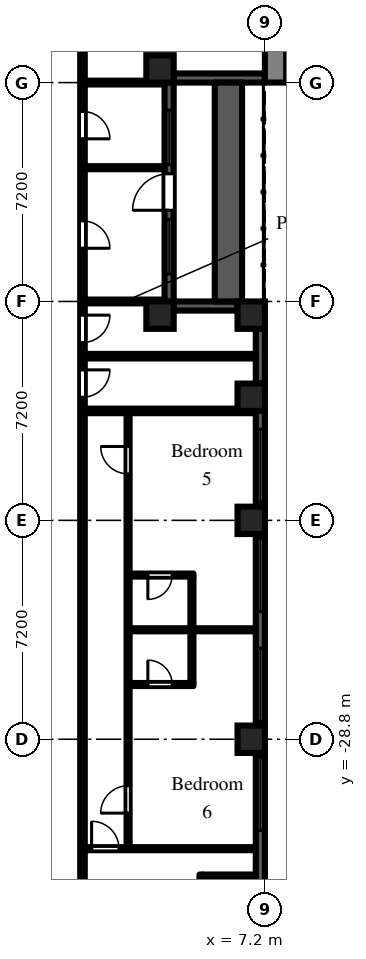
"""IFC4 building model, lengths in metres.
Left out: names, types, materials, properties, quantities, classifications, styles, units other than length and angle.
Written with IfcOpenShell. Run it as: python <this file> out.ifc"""

import sys

from ifc_helpers import new_model, si_unit, direction, frame, frame_2d, origin, origin_2d, place, context, subcontext, project, spatial, rectangle, extrude, element, fill, save


model = new_model("IFC4")
c1 = context("Model", 3, precision=1e-05, world=origin(), true_north=direction((0.0, 1.0)))
c2 = subcontext(c1, "Body", "Model", "MODEL_VIEW")
j1 = project(units=[si_unit("LENGTHUNIT", "METRE"), si_unit("PLANEANGLEUNIT", "RADIAN")], contexts=[c1])
p1 = place(None, origin())
s1 = spatial("IfcSite", under=j1, at=p1, CompositionType="ELEMENT")
p2 = place(p1, origin())
s2 = spatial("IfcBuilding", under=s1, at=p2, CompositionType="ELEMENT")
p3 = place(p2, frame((0.0, 0.0, 53.7)))
s3 = spatial("IfcBuildingStorey", under=s2, at=p3, CompositionType="ELEMENT", Elevation=53.7)
for number, where, z_axis, x_axis in (
    (1, (3.75, -14.85, 0.0), (0.0, 0.0, 1.0), (1.0, 0.0, 0.0)),
    (2, (3.75, -6.75, 0.0), (0.0, 0.0, 1.0), (1.0, 0.0, 0.0)),
    (3, (6.75, -28.8, 0.0), (0.0, 0.0, 1.0), (1.0, 0.0, 0.0)),
    (4, (6.75, -21.6, 0.0), (0.0, 0.0, 1.0), (1.0, 0.0, 0.0)),
    (5, (6.75, -17.55, 0.0), (0.0, 0.0, 1.0), (1.0, 0.0, 0.0)),
    (6, (6.75, -14.85, 0.0), (0.0, 0.0, 1.0), (1.0, 0.0, 0.0)),
):
    element("IfcColumn", number, at=place(p3, frame(where, z_axis=z_axis, x_axis=x_axis)), inside=s3, PredefinedType="COLUMN", context=c2, shape_type="SweptSolid", body=[
        extrude(rectangle(XDim=0.9, YDim=0.9, at=origin_2d()), origin(), (0.0, 0.0, 1.0), 3.0),
    ])
p4 = place(p3, frame((7.05, -35.55, 0.0), z_axis=(0.0, 0.0, 1.0), x_axis=(0.0, 1.0, 0.0)))
e7 = element("IfcWall", 7, at=p4, inside=s3, PredefinedType="SOLIDWALL", context=c2, shape_type="SweptSolid", body=[
    extrude(rectangle(XDim=6.3, YDim=0.3, at=frame_2d((3.15, 0.0))), origin(), (0.0, 0.0, 1.0), 2.1),
])
p5 = place(p4, frame((3.75, 0.0, 0.2)))
e8 = element("IfcOpeningElement", 8, at=p5, cuts=e7, PredefinedType="OPENING", context=c2, shape_type="SweptSolid", body=[
    extrude(rectangle(XDim=2.4, YDim=1.85, at=frame_2d((1.2, 0.925))), frame((0.0, 0.16, 0.0), z_axis=(0.0, -1.0, 0.0), x_axis=(1.0, 0.0, 0.0)), (0.0, 0.0, 1.0), 0.32),
])
p6 = place(p3, frame((7.05, -28.35, 0.0), z_axis=(0.0, 0.0, 1.0), x_axis=(0.0, 1.0, 0.0)))
e9 = element("IfcWall", 9, at=p6, inside=s3, PredefinedType="SOLIDWALL", context=c2, shape_type="SweptSolid", body=[
    extrude(rectangle(XDim=6.3, YDim=0.3, at=frame_2d((3.15, 0.0))), origin(), (0.0, 0.0, 1.0), 2.1),
])
p7 = place(p6, frame((0.15, 0.0, 0.2)))
e10 = element("IfcOpeningElement", 10, at=p7, cuts=e9, PredefinedType="OPENING", context=c2, shape_type="SweptSolid", body=[
    extrude(rectangle(XDim=2.4, YDim=1.85, at=frame_2d((1.2, 0.925))), frame((0.0, 0.16, 0.0), z_axis=(0.0, -1.0, 0.0), x_axis=(1.0, 0.0, 0.0)), (0.0, 0.0, 1.0), 0.32),
])
p8 = place(p6, frame((3.75, 0.0, 0.2)))
e11 = element("IfcOpeningElement", 11, at=p8, cuts=e9, PredefinedType="OPENING", context=c2, shape_type="SweptSolid", body=[
    extrude(rectangle(XDim=2.4, YDim=1.85, at=frame_2d((1.2, 0.925))), frame((0.0, 0.16, 0.0), z_axis=(0.0, -1.0, 0.0), x_axis=(1.0, 0.0, 0.0)), (0.0, 0.0, 1.0), 0.32),
])
p9 = place(p3, frame((7.05, -21.15, 0.0), z_axis=(0.0, 0.0, 1.0), x_axis=(0.0, 1.0, 0.0)))
e12 = element("IfcWall", 12, at=p9, inside=s3, PredefinedType="SOLIDWALL", context=c2, shape_type="SweptSolid", body=[
    extrude(rectangle(XDim=3.15, YDim=0.3, at=frame_2d((1.575, 0.0))), origin(), (0.0, 0.0, 1.0), 2.1),
])
p10 = place(p9, frame((0.15, 0.0, 0.2)))
e13 = element("IfcOpeningElement", 13, at=p10, cuts=e12, PredefinedType="OPENING", context=c2, shape_type="SweptSolid", body=[
    extrude(rectangle(XDim=2.4, YDim=1.85, at=frame_2d((1.2, 0.925))), frame((0.0, 0.16, 0.0), z_axis=(0.0, -1.0, 0.0), x_axis=(1.0, 0.0, 0.0)), (0.0, 0.0, 1.0), 0.32),
])
p11 = place(p3, frame((7.05, -17.1, 0.0), z_axis=(0.0, 0.0, 1.0), x_axis=(0.0, 1.0, 0.0)))
e14 = element("IfcWall", 14, at=p11, inside=s3, PredefinedType="SOLIDWALL", context=c2, shape_type="SweptSolid", body=[
    extrude(rectangle(XDim=1.8, YDim=0.3, at=frame_2d((0.9, 0.0))), origin(), (0.0, 0.0, 1.0), 2.1),
])
p12 = place(p3, frame((6.3, -14.55, 0.0), z_axis=(0.0, 0.0, 1.0), x_axis=(-1.0, 0.0, 0.0)))
e15 = element("IfcWall", 15, at=p12, inside=s3, PredefinedType="SOLIDWALL", context=c2, shape_type="SweptSolid", body=[
    extrude(rectangle(XDim=2.1, YDim=0.3, at=frame_2d((1.05, 0.0))), origin(), (0.0, 0.0, 1.0), 2.1),
])
p13 = place(p3, frame((4.05, -14.4, 0.0), z_axis=(0.0, 0.0, 1.0), x_axis=(0.0, 1.0, 0.0)))
e16 = element("IfcWall", 16, at=p13, inside=s3, PredefinedType="SOLIDWALL", context=c2, shape_type="SweptSolid", body=[
    extrude(rectangle(XDim=7.2, YDim=0.3, at=frame_2d((3.6, 0.0))), origin(), (0.0, 0.0, 1.0), 2.1),
])
p14 = place(p13, frame((3.0, 0.0, 0.0)))
e17 = element("IfcOpeningElement", 17, at=p14, cuts=e16, PredefinedType="OPENING", context=c2, shape_type="SweptSolid", body=[
    extrude(rectangle(XDim=1.2, YDim=2.05, at=frame_2d((0.6, 1.025))), frame((0.0, 0.16, 0.0), z_axis=(0.0, -1.0, 0.0), x_axis=(1.0, 0.0, 0.0)), (0.0, 0.0, 1.0), 0.32),
])
p15 = place(p13, frame((0.9, 0.0, 0.2)))
e18 = element("IfcOpeningElement", 18, at=p15, cuts=e16, PredefinedType="OPENING", context=c2, shape_type="SweptSolid", body=[
    extrude(rectangle(XDim=1.8, YDim=1.85, at=frame_2d((0.9, 0.925))), frame((0.0, 0.16, 0.0), z_axis=(0.0, -1.0, 0.0), x_axis=(1.0, 0.0, 0.0)), (0.0, 0.0, 1.0), 0.32),
])
p16 = place(p13, frame((4.5, 0.0, 0.2)))
e19 = element("IfcOpeningElement", 19, at=p16, cuts=e16, PredefinedType="OPENING", context=c2, shape_type="SweptSolid", body=[
    extrude(rectangle(XDim=1.8, YDim=1.85, at=frame_2d((0.9, 0.925))), frame((0.0, 0.16, 0.0), z_axis=(0.0, -1.0, 0.0), x_axis=(1.0, 0.0, 0.0)), (0.0, 0.0, 1.0), 0.32),
])
p17 = place(p3, frame((4.2, -7.05, 0.0), z_axis=(0.0, 0.0, 1.0), x_axis=(1.0, 0.0, 0.0)))
e20 = element("IfcWall", 20, at=p17, inside=s3, PredefinedType="SOLIDWALL", context=c2, shape_type="SweptSolid", body=[
    extrude(rectangle(XDim=3.0, YDim=0.3, at=frame_2d((1.5, 0.0))), origin(), (0.0, 0.0, 1.0), 2.1),
])
p18 = place(p3, frame((6.0, -14.4, 0.0), z_axis=(0.0, 0.0, 1.0), x_axis=(0.0, 1.0, 0.0)))
e21 = element("IfcWall", 21, at=p18, inside=s3, PredefinedType="PARAPET", context=c2, shape_type="SweptSolid", body=[
    extrude(rectangle(XDim=7.2, YDim=0.9, at=frame_2d((3.6, 0.0))), origin(), (0.0, 0.0, 1.0), 0.8),
])
p19 = place(p3, frame((7.55, -7.2, 0.0), z_axis=(0.0, 0.0, 1.0), x_axis=(0.0, 1.0, 0.0)))
e22 = element("IfcWall", 22, at=p19, inside=s3, PredefinedType="SHEAR", context=c2, shape_type="SweptSolid", body=[
    extrude(rectangle(XDim=14.4, YDim=0.7, at=frame_2d((7.2, 0.0))), origin(), (0.0, 0.0, 1.0), 2.575),
])
p20 = place(p19, frame((6.0, 0.0, 0.0)))
e23 = element("IfcOpeningElement", 23, at=p20, cuts=e22, PredefinedType="OPENING", context=c2, shape_type="SweptSolid", body=[
    extrude(rectangle(XDim=2.4, YDim=2.2, at=frame_2d((1.2, 1.1))), frame((0.0, 0.36, 0.0), z_axis=(0.0, -1.0, 0.0), x_axis=(1.0, 0.0, 0.0)), (0.0, 0.0, 1.0), 0.72),
])
p21 = place(p3, frame((1.2, -36.5, 0.0), z_axis=(0.0, 0.0, 1.0), x_axis=(0.0, 1.0, 0.0)))
e24 = element("IfcWall", 24, at=p21, inside=s3, PredefinedType="PARTITIONING", context=c2, shape_type="SweptSolid", body=[
    extrude(rectangle(XDim=35.375, YDim=0.15, at=frame_2d((17.688, 0.0))), origin(), (0.0, 0.0, 1.0), 2.575),
])
p22 = place(p21, frame((33.65, 0.0, 0.0)))
e25 = element("IfcOpeningElement", 25, at=p22, cuts=e24, PredefinedType="OPENING", context=c2, shape_type="SweptSolid", body=[
    extrude(rectangle(XDim=0.9, YDim=2.1, at=frame_2d((0.45, 1.05))), frame((0.0, 0.085, 0.0), z_axis=(0.0, -1.0, 0.0), x_axis=(1.0, 0.0, 0.0)), (0.0, 0.0, 1.0), 0.17),
])
p23 = place(p21, frame((30.65, 0.0, 0.0)))
e26 = element("IfcOpeningElement", 26, at=p23, cuts=e24, PredefinedType="OPENING", context=c2, shape_type="SweptSolid", body=[
    extrude(rectangle(XDim=0.9, YDim=2.1, at=frame_2d((0.45, 1.05))), frame((0.0, 0.085, 0.0), z_axis=(0.0, -1.0, 0.0), x_axis=(1.0, 0.0, 0.0)), (0.0, 0.0, 1.0), 0.17),
])
p24 = place(p21, frame((27.45, 0.0, 0.0)))
e27 = element("IfcOpeningElement", 27, at=p24, cuts=e24, PredefinedType="OPENING", context=c2, shape_type="SweptSolid", body=[
    extrude(rectangle(XDim=0.9, YDim=2.1, at=frame_2d((0.45, 1.05))), frame((0.0, 0.085, 0.0), z_axis=(0.0, -1.0, 0.0), x_axis=(1.0, 0.0, 0.0)), (0.0, 0.0, 1.0), 0.17),
])
p25 = place(p21, frame((23.85, 0.0, 0.0)))
e28 = element("IfcOpeningElement", 28, at=p25, cuts=e24, PredefinedType="OPENING", context=c2, shape_type="SweptSolid", body=[
    extrude(rectangle(XDim=0.9, YDim=2.1, at=frame_2d((0.45, 1.05))), frame((0.0, 0.085, 0.0), z_axis=(0.0, -1.0, 0.0), x_axis=(1.0, 0.0, 0.0)), (0.0, 0.0, 1.0), 0.17),
])
p26 = place(p21, frame((20.75, 0.0, 0.0)))
e29 = element("IfcOpeningElement", 29, at=p26, cuts=e24, PredefinedType="OPENING", context=c2, shape_type="SweptSolid", body=[
    extrude(rectangle(XDim=0.9, YDim=2.1, at=frame_2d((0.45, 1.05))), frame((0.0, 0.085, 0.0), z_axis=(0.0, -1.0, 0.0), x_axis=(1.0, 0.0, 0.0)), (0.0, 0.0, 1.0), 0.17),
])
p27 = place(p21, frame((18.95, 0.0, 0.0)))
e30 = element("IfcOpeningElement", 30, at=p27, cuts=e24, PredefinedType="OPENING", context=c2, shape_type="SweptSolid", body=[
    extrude(rectangle(XDim=0.9, YDim=2.1, at=frame_2d((0.45, 1.05))), frame((0.0, 0.085, 0.0), z_axis=(0.0, -1.0, 0.0), x_axis=(1.0, 0.0, 0.0)), (0.0, 0.0, 1.0), 0.17),
])
p28 = place(p21, frame((1.55, 0.0, 0.0)))
e31 = element("IfcOpeningElement", 31, at=p28, cuts=e24, PredefinedType="OPENING", context=c2, shape_type="SweptSolid", body=[
    extrude(rectangle(XDim=1.0, YDim=2.1, at=frame_2d((0.5, 1.05))), frame((0.0, 0.085, 0.0), z_axis=(0.0, -1.0, 0.0), x_axis=(1.0, 0.0, 0.0)), (0.0, 0.0, 1.0), 0.17),
])
p29 = place(p3, frame((1.275, -32.4, 0.0), z_axis=(0.0, 0.0, 1.0), x_axis=(1.0, 0.0, 0.0)))
e32 = element("IfcWall", 32, at=p29, inside=s3, PredefinedType="PARTITIONING", context=c2, shape_type="SweptSolid", body=[
    extrude(rectangle(XDim=5.625, YDim=0.1, at=frame_2d((2.812, 0.0))), origin(), (0.0, 0.0, 1.0), 2.575),
])
p30 = place(p29, frame((0.225, 0.0, 0.0)))
e33 = element("IfcOpeningElement", 33, at=p30, cuts=e32, PredefinedType="OPENING", context=c2, shape_type="SweptSolid", body=[
    extrude(rectangle(XDim=0.9, YDim=2.1, at=frame_2d((0.45, 1.05))), frame((0.0, 0.06, 0.0), z_axis=(0.0, -1.0, 0.0), x_axis=(1.0, 0.0, 0.0)), (0.0, 0.0, 1.0), 0.12),
])
for number, where, z_axis, x_axis in (
    (34, (1.275, -18.0, 0.0), (0.0, 0.0, 1.0), (1.0, 0.0, 0.0)),
    (35, (1.275, -16.2, 0.0), (0.0, 0.0, 1.0), (1.0, 0.0, 0.0)),
):
    element("IfcWall", number, at=place(p3, frame(where, z_axis=z_axis, x_axis=x_axis)), inside=s3, PredefinedType="PARTITIONING", context=c2, shape_type="SweptSolid", body=[
        extrude(rectangle(XDim=5.625, YDim=0.15, at=frame_2d((2.812, 0.0))), origin(), (0.0, 0.0, 1.0), 2.575),
    ])
p31 = place(p3, frame((1.275, -14.4, 0.0), z_axis=(0.0, 0.0, 1.0), x_axis=(1.0, 0.0, 0.0)))
e36 = element("IfcWall", 36, at=p31, inside=s3, PredefinedType="PARTITIONING", context=c2, shape_type="SweptSolid", body=[
    extrude(rectangle(XDim=2.625, YDim=0.125, at=frame_2d((1.312, 0.0))), origin(), (0.0, 0.0, 1.0), 2.575),
])
p32 = place(p3, frame((1.275, -10.0, 0.0), z_axis=(0.0, 0.0, 1.0), x_axis=(1.0, 0.0, 0.0)))
e37 = element("IfcWall", 37, at=p32, inside=s3, PredefinedType="PARTITIONING", context=c2, shape_type="SweptSolid", body=[
    extrude(rectangle(XDim=2.625, YDim=0.1, at=frame_2d((1.312, 0.0))), origin(), (0.0, 0.0, 1.0), 2.575),
])
p33 = place(p3, frame((1.275, -7.2, 0.0), z_axis=(0.0, 0.0, 1.0), x_axis=(1.0, 0.0, 0.0)))
e38 = element("IfcWall", 38, at=p33, inside=s3, PredefinedType="PARTITIONING", context=c2, shape_type="SweptSolid", body=[
    extrude(rectangle(XDim=2.625, YDim=0.125, at=frame_2d((1.312, 0.0))), origin(), (0.0, 0.0, 1.0), 2.575),
])
p34 = place(p3, frame((2.7, -32.35, 0.0), z_axis=(0.0, 0.0, 1.0), x_axis=(0.0, 1.0, 0.0)))
e39 = element("IfcWall", 39, at=p34, inside=s3, PredefinedType="PARTITIONING", context=c2, shape_type="SweptSolid", body=[
    extrude(rectangle(XDim=14.275, YDim=0.1, at=frame_2d((7.138, 0.0))), origin(), (0.0, 0.0, 1.0), 2.575),
])
p35 = place(p34, frame((1.12, 0.0, 0.0)))
e40 = element("IfcOpeningElement", 40, at=p35, cuts=e39, PredefinedType="OPENING", context=c2, shape_type="SweptSolid", body=[
    extrude(rectangle(XDim=0.9, YDim=2.1, at=frame_2d((0.45, 1.05))), frame((0.0, 0.06, 0.0), z_axis=(0.0, -1.0, 0.0), x_axis=(1.0, 0.0, 0.0)), (0.0, 0.0, 1.0), 0.12),
])
p36 = place(p34, frame((12.28, 0.0, 0.0)))
e41 = element("IfcOpeningElement", 41, at=p36, cuts=e39, PredefinedType="OPENING", context=c2, shape_type="SweptSolid", body=[
    extrude(rectangle(XDim=0.9, YDim=2.1, at=frame_2d((0.45, 1.05))), frame((0.0, 0.06, 0.0), z_axis=(0.0, -1.0, 0.0), x_axis=(1.0, 0.0, 0.0)), (0.0, 0.0, 1.0), 0.12),
])
p37 = place(p3, frame((2.75, -27.0, 0.0), z_axis=(0.0, 0.0, 1.0), x_axis=(1.0, 0.0, 0.0)))
e42 = element("IfcWall", 42, at=p37, inside=s3, PredefinedType="PARTITIONING", context=c2, shape_type="SweptSolid", body=[
    extrude(rectangle(XDim=2.1, YDim=0.1, at=frame_2d((1.05, 0.0))), origin(), (0.0, 0.0, 1.0), 2.575),
])
p38 = place(p37, frame((0.6, 0.0, 0.0)))
e43 = element("IfcOpeningElement", 43, at=p38, cuts=e42, PredefinedType="OPENING", context=c2, shape_type="SweptSolid", body=[
    extrude(rectangle(XDim=0.8, YDim=2.1, at=frame_2d((0.4, 1.05))), frame((0.0, 0.06, 0.0), z_axis=(0.0, -1.0, 0.0), x_axis=(1.0, 0.0, 0.0)), (0.0, 0.0, 1.0), 0.12),
])
p39 = place(p3, frame((2.75, -25.2, 0.0), z_axis=(0.0, 0.0, 1.0), x_axis=(1.0, 0.0, 0.0)))
e44 = element("IfcWall", 44, at=p39, inside=s3, PredefinedType="PARTITIONING", context=c2, shape_type="SweptSolid", body=[
    extrude(rectangle(XDim=4.15, YDim=0.1, at=frame_2d((2.075, 0.0))), origin(), (0.0, 0.0, 1.0), 2.575),
])
p40 = place(p3, frame((2.75, -23.4, 0.0), z_axis=(0.0, 0.0, 1.0), x_axis=(1.0, 0.0, 0.0)))
e45 = element("IfcWall", 45, at=p40, inside=s3, PredefinedType="PARTITIONING", context=c2, shape_type="SweptSolid", body=[
    extrude(rectangle(XDim=2.1, YDim=0.1, at=frame_2d((1.05, 0.0))), origin(), (0.0, 0.0, 1.0), 2.575),
])
p41 = place(p40, frame((0.6, 0.0, 0.0)))
e46 = element("IfcOpeningElement", 46, at=p41, cuts=e45, PredefinedType="OPENING", context=c2, shape_type="SweptSolid", body=[
    extrude(rectangle(XDim=0.8, YDim=2.1, at=frame_2d((0.4, 1.05))), frame((0.0, 0.06, 0.0), z_axis=(0.0, -1.0, 0.0), x_axis=(1.0, 0.0, 0.0)), (0.0, 0.0, 1.0), 0.12),
])
p42 = place(p3, frame((4.8, -26.95, 0.0), z_axis=(0.0, 0.0, 1.0), x_axis=(0.0, 1.0, 0.0)))
e47 = element("IfcWall", 47, at=p42, inside=s3, PredefinedType="PARTITIONING", context=c2, shape_type="SweptSolid", body=[
    extrude(rectangle(XDim=3.5, YDim=0.1, at=frame_2d((1.75, 0.0))), origin(), (0.0, 0.0, 1.0), 2.575),
])
p43 = place(p3, frame((5.1, -35.15, 0.0), z_axis=(0.0, 0.0, 1.0), x_axis=(0.0, 1.0, 0.0)))
e48 = element("IfcWall", 48, at=p43, inside=s3, PredefinedType="PARTITIONING", context=c2, shape_type="SweptSolid", body=[
    extrude(rectangle(XDim=1.9, YDim=0.1, at=frame_2d((0.95, 0.0))), origin(), (0.0, 0.0, 1.0), 2.575),
])
p44 = place(p43, frame((0.55, 0.0, 0.0)))
e49 = element("IfcOpeningElement", 49, at=p44, cuts=e48, PredefinedType="OPENING", context=c2, shape_type="SweptSolid", body=[
    extrude(rectangle(XDim=0.8, YDim=2.1, at=frame_2d((0.4, 1.05))), frame((0.0, 0.06, 0.0), z_axis=(0.0, -1.0, 0.0), x_axis=(1.0, 0.0, 0.0)), (0.0, 0.0, 1.0), 0.12),
])
p45 = place(p3, frame((5.15, -33.3, 0.0), z_axis=(0.0, 0.0, 1.0), x_axis=(1.0, 0.0, 0.0)))
e50 = element("IfcWall", 50, at=p45, inside=s3, PredefinedType="PARTITIONING", context=c2, shape_type="SweptSolid", body=[
    extrude(rectangle(XDim=1.75, YDim=0.1, at=frame_2d((0.875, 0.0))), origin(), (0.0, 0.0, 1.0), 2.575),
])
p46 = place(p5, origin())
e51 = element("IfcWindow", 51, at=p46, inside=s3, PartitioningType="SINGLE_PANEL", PredefinedType="WINDOW", context=c2, shape_type="SweptSolid", body=[
    extrude(rectangle(XDim=2.4, YDim=1.85, at=frame_2d((1.2, 0.925))), frame((0.0, 0.03, 0.0), z_axis=(0.0, -1.0, 0.0), x_axis=(1.0, 0.0, 0.0)), (0.0, 0.0, 1.0), 0.06),
])
fill(e8, e51)
p47 = place(p7, origin())
e52 = element("IfcWindow", 52, at=p47, inside=s3, PartitioningType="SINGLE_PANEL", PredefinedType="WINDOW", context=c2, shape_type="SweptSolid", body=[
    extrude(rectangle(XDim=2.4, YDim=1.85, at=frame_2d((1.2, 0.925))), frame((0.0, 0.03, 0.0), z_axis=(0.0, -1.0, 0.0), x_axis=(1.0, 0.0, 0.0)), (0.0, 0.0, 1.0), 0.06),
])
fill(e10, e52)
p48 = place(p8, origin())
e53 = element("IfcWindow", 53, at=p48, inside=s3, PartitioningType="SINGLE_PANEL", PredefinedType="WINDOW", context=c2, shape_type="SweptSolid", body=[
    extrude(rectangle(XDim=2.4, YDim=1.85, at=frame_2d((1.2, 0.925))), frame((0.0, 0.03, 0.0), z_axis=(0.0, -1.0, 0.0), x_axis=(1.0, 0.0, 0.0)), (0.0, 0.0, 1.0), 0.06),
])
fill(e11, e53)
p49 = place(p10, origin())
e54 = element("IfcWindow", 54, at=p49, inside=s3, PartitioningType="SINGLE_PANEL", PredefinedType="WINDOW", context=c2, shape_type="SweptSolid", body=[
    extrude(rectangle(XDim=2.4, YDim=1.85, at=frame_2d((1.2, 0.925))), frame((0.0, 0.03, 0.0), z_axis=(0.0, -1.0, 0.0), x_axis=(1.0, 0.0, 0.0)), (0.0, 0.0, 1.0), 0.06),
])
fill(e13, e54)
p50 = place(p14, origin())
e55 = element("IfcDoor", 55, at=p50, inside=s3, OperationType="SINGLE_SWING_LEFT", PredefinedType="DOOR", context=c2, shape_type="SweptSolid", body=[
    extrude(rectangle(XDim=1.2, YDim=2.05, at=frame_2d((0.6, 1.025))), frame((0.0, 0.025, 0.0), z_axis=(0.0, -1.0, 0.0), x_axis=(1.0, 0.0, 0.0)), (0.0, 0.0, 1.0), 0.05),
])
fill(e17, e55)
p51 = place(p15, origin())
e56 = element("IfcWindow", 56, at=p51, inside=s3, PartitioningType="SINGLE_PANEL", PredefinedType="WINDOW", context=c2, shape_type="SweptSolid", body=[
    extrude(rectangle(XDim=1.8, YDim=1.85, at=frame_2d((0.9, 0.925))), frame((0.0, 0.03, 0.0), z_axis=(0.0, -1.0, 0.0), x_axis=(1.0, 0.0, 0.0)), (0.0, 0.0, 1.0), 0.06),
])
fill(e18, e56)
p52 = place(p16, origin())
e57 = element("IfcWindow", 57, at=p52, inside=s3, PartitioningType="SINGLE_PANEL", PredefinedType="WINDOW", context=c2, shape_type="SweptSolid", body=[
    extrude(rectangle(XDim=1.8, YDim=1.85, at=frame_2d((0.9, 0.925))), frame((0.0, 0.03, 0.0), z_axis=(0.0, -1.0, 0.0), x_axis=(1.0, 0.0, 0.0)), (0.0, 0.0, 1.0), 0.06),
])
fill(e19, e57)
p53 = place(p24, frame((0.9, 0.0, 0.0), z_axis=(0.0, 0.0, 1.0), x_axis=(-1.0, 0.0, 0.0)))
e58 = element("IfcDoor", 58, at=p53, inside=s3, OperationType="SINGLE_SWING_RIGHT", PredefinedType="DOOR", context=c2, shape_type="SweptSolid", body=[
    extrude(rectangle(XDim=0.9, YDim=2.1, at=frame_2d((0.45, 1.05))), frame((0.0, 0.025, 0.0), z_axis=(0.0, -1.0, 0.0), x_axis=(1.0, 0.0, 0.0)), (0.0, 0.0, 1.0), 0.05),
])
fill(e27, e58)
p54 = place(p25, frame((0.9, 0.0, 0.0), z_axis=(0.0, 0.0, 1.0), x_axis=(-1.0, 0.0, 0.0)))
e59 = element("IfcDoor", 59, at=p54, inside=s3, OperationType="SINGLE_SWING_RIGHT", PredefinedType="DOOR", context=c2, shape_type="SweptSolid", body=[
    extrude(rectangle(XDim=0.9, YDim=2.1, at=frame_2d((0.45, 1.05))), frame((0.0, 0.025, 0.0), z_axis=(0.0, -1.0, 0.0), x_axis=(1.0, 0.0, 0.0)), (0.0, 0.0, 1.0), 0.05),
])
fill(e28, e59)
p55 = place(p26, frame((0.9, 0.0, 0.0), z_axis=(0.0, 0.0, 1.0), x_axis=(-1.0, 0.0, 0.0)))
e60 = element("IfcDoor", 60, at=p55, inside=s3, OperationType="SINGLE_SWING_LEFT", PredefinedType="DOOR", context=c2, shape_type="SweptSolid", body=[
    extrude(rectangle(XDim=0.9, YDim=2.1, at=frame_2d((0.45, 1.05))), frame((0.0, 0.025, 0.0), z_axis=(0.0, -1.0, 0.0), x_axis=(1.0, 0.0, 0.0)), (0.0, 0.0, 1.0), 0.05),
])
fill(e29, e60)
p56 = place(p27, frame((0.9, 0.0, 0.0), z_axis=(0.0, 0.0, 1.0), x_axis=(-1.0, 0.0, 0.0)))
e61 = element("IfcDoor", 61, at=p56, inside=s3, OperationType="SINGLE_SWING_LEFT", PredefinedType="DOOR", context=c2, shape_type="SweptSolid", body=[
    extrude(rectangle(XDim=0.9, YDim=2.1, at=frame_2d((0.45, 1.05))), frame((0.0, 0.025, 0.0), z_axis=(0.0, -1.0, 0.0), x_axis=(1.0, 0.0, 0.0)), (0.0, 0.0, 1.0), 0.05),
])
fill(e30, e61)
p57 = place(p30, origin())
e62 = element("IfcDoor", 62, at=p57, inside=s3, OperationType="SINGLE_SWING_LEFT", PredefinedType="DOOR", context=c2, shape_type="SweptSolid", body=[
    extrude(rectangle(XDim=0.9, YDim=2.1, at=frame_2d((0.45, 1.05))), frame((0.0, 0.025, 0.0), z_axis=(0.0, -1.0, 0.0), x_axis=(1.0, 0.0, 0.0)), (0.0, 0.0, 1.0), 0.05),
])
fill(e33, e62)
p58 = place(p35, origin())
e63 = element("IfcDoor", 63, at=p58, inside=s3, OperationType="SINGLE_SWING_LEFT", PredefinedType="DOOR", context=c2, shape_type="SweptSolid", body=[
    extrude(rectangle(XDim=0.9, YDim=2.1, at=frame_2d((0.45, 1.05))), frame((0.0, 0.025, 0.0), z_axis=(0.0, -1.0, 0.0), x_axis=(1.0, 0.0, 0.0)), (0.0, 0.0, 1.0), 0.05),
])
fill(e40, e63)
p59 = place(p36, origin())
e64 = element("IfcDoor", 64, at=p59, inside=s3, OperationType="SINGLE_SWING_RIGHT", PredefinedType="DOOR", context=c2, shape_type="SweptSolid", body=[
    extrude(rectangle(XDim=0.9, YDim=2.1, at=frame_2d((0.45, 1.05))), frame((0.0, 0.025, 0.0), z_axis=(0.0, -1.0, 0.0), x_axis=(1.0, 0.0, 0.0)), (0.0, 0.0, 1.0), 0.05),
])
fill(e41, e64)
p60 = place(p41, frame((0.8, 0.0, 0.0), z_axis=(0.0, 0.0, 1.0), x_axis=(-1.0, 0.0, 0.0)))
e65 = element("IfcDoor", 65, at=p60, inside=s3, OperationType="SINGLE_SWING_RIGHT", PredefinedType="DOOR", context=c2, shape_type="SweptSolid", body=[
    extrude(rectangle(XDim=0.8, YDim=2.1, at=frame_2d((0.4, 1.05))), frame((0.0, 0.025, 0.0), z_axis=(0.0, -1.0, 0.0), x_axis=(1.0, 0.0, 0.0)), (0.0, 0.0, 1.0), 0.05),
])
fill(e46, e65)
p61 = place(p38, origin())
e66 = element("IfcDoor", 66, at=p61, inside=s3, OperationType="SINGLE_SWING_LEFT", PredefinedType="DOOR", context=c2, shape_type="SweptSolid", body=[
    extrude(rectangle(XDim=0.8, YDim=2.1, at=frame_2d((0.4, 1.05))), frame((0.0, 0.025, 0.0), z_axis=(0.0, -1.0, 0.0), x_axis=(1.0, 0.0, 0.0)), (0.0, 0.0, 1.0), 0.05),
])
fill(e43, e66)
save(model, sys.argv[1])
